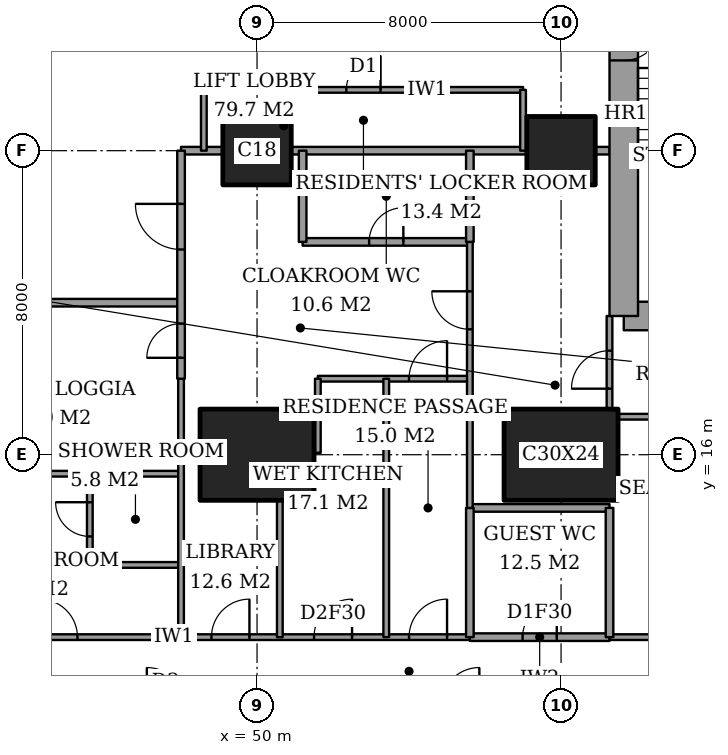
"""IFC4 building model, lengths in metres.
Left out: names, types, materials, properties, quantities, classifications, styles, units other than length and angle.
Written with IfcOpenShell. Run it as: python <this file> out.ifc"""

import sys

from ifc_helpers import new_model, si_unit, direction, frame, frame_2d, origin, origin_2d, place, context, subcontext, project, spatial, rectangle, extrude, element, fill, save


model = new_model("IFC4")
c1 = context("Model", 3, precision=1e-05, world=origin(), true_north=direction((0.0, 1.0)))
c2 = subcontext(c1, "Body", "Model", "MODEL_VIEW")
j1 = project(units=[si_unit("LENGTHUNIT", "METRE"), si_unit("PLANEANGLEUNIT", "RADIAN")], contexts=[c1])
p1 = place(None, origin())
s1 = spatial("IfcSite", under=j1, at=p1, CompositionType="ELEMENT")
p2 = place(p1, origin())
s2 = spatial("IfcBuilding", under=s1, at=p2, CompositionType="ELEMENT")
p3 = place(p2, frame((0.0, 0.0, 185.8)))
s3 = spatial("IfcBuildingStorey", under=s2, at=p3, CompositionType="ELEMENT", Elevation=185.8)
p4 = place(p3, frame((50.0, 16.0, 0.0), z_axis=(0.0, 0.0, 1.0), x_axis=(1.0, 0.0, 0.0)))
e1 = element("IfcColumn", 1, at=p4, inside=s3, PredefinedType="COLUMN", context=c2, shape_type="SweptSolid", body=[
    extrude(rectangle(XDim=3.0, YDim=2.4, at=origin_2d()), origin(), (0.0, 0.0, 1.0), 3.6),
])
p5 = place(p3, frame((50.0, 24.0, 0.0), z_axis=(0.0, 0.0, 1.0), x_axis=(1.0, 0.0, 0.0)))
e2 = element("IfcColumn", 2, at=p5, inside=s3, PredefinedType="COLUMN", context=c2, shape_type="SweptSolid", body=[
    extrude(rectangle(XDim=1.8, YDim=1.8, at=origin_2d()), origin(), (0.0, 0.0, 1.0), 3.6),
])
p6 = place(p3, frame((58.0, 16.0, 0.0), z_axis=(0.0, 0.0, 1.0), x_axis=(1.0, 0.0, 0.0)))
e3 = element("IfcColumn", 3, at=p6, inside=s3, PredefinedType="COLUMN", context=c2, shape_type="SweptSolid", body=[
    extrude(rectangle(XDim=3.0, YDim=2.4, at=origin_2d()), origin(), (0.0, 0.0, 1.0), 3.6),
])
p7 = place(p3, frame((58.0, 24.0, 0.0), z_axis=(0.0, 0.0, 1.0), x_axis=(1.0, 0.0, 0.0)))
e4 = element("IfcColumn", 4, at=p7, inside=s3, PredefinedType="COLUMN", context=c2, shape_type="SweptSolid", body=[
    extrude(rectangle(XDim=1.8, YDim=1.8, at=origin_2d()), origin(), (0.0, 0.0, 1.0), 3.6),
])
p8 = place(p3, frame((59.65, 19.65, 0.0), z_axis=(0.0, 0.0, 1.0), x_axis=(1.0, 0.0, 0.0)))
e5 = element("IfcWall", 5, at=p8, inside=s3, PredefinedType="SHEAR", context=c2, shape_type="SweptSolid", body=[
    extrude(rectangle(XDim=4.45, YDim=0.75, at=frame_2d((2.225, 0.0))), origin(), (0.0, 0.0, 1.0), 3.6),
])
p9 = place(p3, frame((59.65, 28.35, 0.0), z_axis=(0.0, 0.0, 1.0), x_axis=(0.0, -1.0, 0.0)))
e6 = element("IfcWall", 6, at=p9, inside=s3, PredefinedType="SHEAR", context=c2, shape_type="SweptSolid", body=[
    extrude(rectangle(XDim=8.7, YDim=0.75, at=frame_2d((4.35, 0.0))), origin(), (0.0, 0.0, 1.0), 3.6),
])
p10 = place(p9, frame((0.975, 0.0, 0.0)))
e7 = element("IfcOpeningElement", 7, at=p10, cuts=e6, PredefinedType="OPENING", context=c2, shape_type="SweptSolid", body=[
    extrude(rectangle(XDim=1.0, YDim=2.1, at=frame_2d((0.5, 1.05))), frame((0.0, 0.385, 0.0), z_axis=(0.0, -1.0, 0.0), x_axis=(1.0, 0.0, 0.0)), (0.0, 0.0, 1.0), 0.77),
])
p11 = place(p3, frame((55.6, 11.2, 0.0), z_axis=(0.0, 0.0, 1.0), x_axis=(1.0, 0.0, 0.0)))
e8 = element("IfcWall", 8, at=p11, inside=s3, PredefinedType="PARTITIONING", context=c2, shape_type="SweptSolid", body=[
    extrude(rectangle(XDim=3.675, YDim=0.2, at=frame_2d((1.837, 0.0))), origin(), (0.0, 0.0, 1.0), 3.35),
])
p12 = place(p11, frame((1.387, 0.0, 0.0)))
e9 = element("IfcOpeningElement", 9, at=p12, cuts=e8, PredefinedType="OPENING", context=c2, shape_type="SweptSolid", body=[
    extrude(rectangle(XDim=0.9, YDim=2.1, at=frame_2d((0.45, 1.05))), frame((0.0, 0.11, 0.0), z_axis=(0.0, -1.0, 0.0), x_axis=(1.0, 0.0, 0.0)), (0.0, 0.0, 1.0), 0.22),
])
p13 = place(p3, frame((41.439, 11.2, 0.0), z_axis=(0.0, 0.0, 1.0), x_axis=(1.0, 0.0, 0.0)))
e10 = element("IfcWall", 10, at=p13, inside=s3, PredefinedType="PARTITIONING", context=c2, shape_type="SweptSolid", body=[
    extrude(rectangle(XDim=14.161, YDim=0.15, at=frame_2d((7.081, 0.0))), origin(), (0.0, 0.0, 1.0), 3.35),
])
p14 = place(p13, frame((12.561, 0.0, 0.0)))
e11 = element("IfcOpeningElement", 11, at=p14, cuts=e10, PredefinedType="OPENING", context=c2, shape_type="SweptSolid", body=[
    extrude(rectangle(XDim=1.0, YDim=2.1, at=frame_2d((0.5, 1.05))), frame((0.0, 0.085, 0.0), z_axis=(0.0, -1.0, 0.0), x_axis=(1.0, 0.0, 0.0)), (0.0, 0.0, 1.0), 0.17),
])
p15 = place(p13, frame((10.061, 0.0, 0.0)))
e12 = element("IfcOpeningElement", 12, at=p15, cuts=e10, PredefinedType="OPENING", context=c2, shape_type="SweptSolid", body=[
    extrude(rectangle(XDim=1.0, YDim=2.1, at=frame_2d((0.5, 1.05))), frame((0.0, 0.085, 0.0), z_axis=(0.0, -1.0, 0.0), x_axis=(1.0, 0.0, 0.0)), (0.0, 0.0, 1.0), 0.17),
])
p16 = place(p13, frame((7.361, 0.0, 0.0)))
e13 = element("IfcOpeningElement", 13, at=p16, cuts=e10, PredefinedType="OPENING", context=c2, shape_type="SweptSolid", body=[
    extrude(rectangle(XDim=1.0, YDim=2.1, at=frame_2d((0.5, 1.05))), frame((0.0, 0.085, 0.0), z_axis=(0.0, -1.0, 0.0), x_axis=(1.0, 0.0, 0.0)), (0.0, 0.0, 1.0), 0.17),
])
p17 = place(p13, frame((2.836, 0.0, 0.0)))
e14 = element("IfcOpeningElement", 14, at=p17, cuts=e10, PredefinedType="OPENING", context=c2, shape_type="SweptSolid", body=[
    extrude(rectangle(XDim=1.0, YDim=2.1, at=frame_2d((0.5, 1.05))), frame((0.0, 0.085, 0.0), z_axis=(0.0, -1.0, 0.0), x_axis=(1.0, 0.0, 0.0)), (0.0, 0.0, 1.0), 0.17),
])
p18 = place(p3, frame((59.275, 11.2, 0.0), z_axis=(0.0, 0.0, 1.0), x_axis=(1.0, 0.0, 0.0)))
e15 = element("IfcWall", 15, at=p18, inside=s3, PredefinedType="PARTITIONING", context=c2, shape_type="SweptSolid", body=[
    extrude(rectangle(XDim=7.175, YDim=0.15, at=frame_2d((3.587, 0.0))), origin(), (0.0, 0.0, 1.0), 3.35),
])
p19 = place(p18, frame((3.087, 0.0, 0.0)))
e16 = element("IfcOpeningElement", 16, at=p19, cuts=e15, PredefinedType="OPENING", context=c2, shape_type="SweptSolid", body=[
    extrude(rectangle(XDim=1.0, YDim=2.1, at=frame_2d((0.5, 1.05))), frame((0.0, 0.085, 0.0), z_axis=(0.0, -1.0, 0.0), x_axis=(1.0, 0.0, 0.0)), (0.0, 0.0, 1.0), 0.17),
])
p20 = place(p3, frame((45.6, 13.1, 0.0), z_axis=(0.0, 0.0, 1.0), x_axis=(1.0, 0.0, 0.0)))
e17 = element("IfcWall", 17, at=p20, inside=s3, PredefinedType="PARTITIONING", context=c2, shape_type="SweptSolid", body=[
    extrude(rectangle(XDim=2.4, YDim=0.15, at=frame_2d((1.2, 0.0))), origin(), (0.0, 0.0, 1.0), 3.35),
])
p21 = place(p3, frame((55.6, 14.6, 0.0), z_axis=(0.0, 0.0, 1.0), x_axis=(1.0, 0.0, 0.0)))
e18 = element("IfcWall", 18, at=p21, inside=s3, PredefinedType="PARTITIONING", context=c2, shape_type="SweptSolid", body=[
    extrude(rectangle(XDim=3.675, YDim=0.2, at=frame_2d((1.837, 0.0))), origin(), (0.0, 0.0, 1.0), 3.35),
])
p22 = place(p3, frame((42.0, 15.5, 0.0), z_axis=(0.0, 0.0, 1.0), x_axis=(1.0, 0.0, 0.0)))
e19 = element("IfcWall", 19, at=p22, inside=s3, PredefinedType="PARTITIONING", context=c2, shape_type="SweptSolid", body=[
    extrude(rectangle(XDim=6.0, YDim=0.15, at=frame_2d((3.0, 0.0))), origin(), (0.0, 0.0, 1.0), 3.35),
])
p23 = place(p3, frame((48.0, 16.05, 0.0), z_axis=(0.0, 0.0, 1.0), x_axis=(1.0, 0.0, 0.0)))
e20 = element("IfcWall", 20, at=p23, inside=s3, PredefinedType="PARTITIONING", context=c2, shape_type="SweptSolid", body=[
    extrude(rectangle(XDim=0.5, YDim=0.15, at=frame_2d((0.25, 0.0))), origin(), (0.0, 0.0, 1.0), 2.634),
])
p24 = place(p3, frame((59.5, 17.0, 0.0), z_axis=(0.0, 0.0, 1.0), x_axis=(1.0, 0.0, 0.0)))
e21 = element("IfcWall", 21, at=p24, inside=s3, PredefinedType="PARTITIONING", context=c2, shape_type="SweptSolid", body=[
    extrude(rectangle(XDim=6.95, YDim=0.15, at=frame_2d((3.475, 0.0))), origin(), (0.0, 0.0, 1.0), 3.35),
])
p25 = place(p3, frame((51.6, 18.0, 0.0), z_axis=(0.0, 0.0, 1.0), x_axis=(1.0, 0.0, 0.0)))
e22 = element("IfcWall", 22, at=p25, inside=s3, PredefinedType="PARTITIONING", context=c2, shape_type="SweptSolid", body=[
    extrude(rectangle(XDim=4.0, YDim=0.15, at=frame_2d((2.0, 0.0))), origin(), (0.0, 0.0, 1.0), 3.35),
])
p26 = place(p25, frame((2.4, 0.0, 0.0)))
e23 = element("IfcOpeningElement", 23, at=p26, cuts=e22, PredefinedType="OPENING", context=c2, shape_type="SweptSolid", body=[
    extrude(rectangle(XDim=1.0, YDim=2.1, at=frame_2d((0.5, 1.05))), frame((0.0, 0.085, 0.0), z_axis=(0.0, -1.0, 0.0), x_axis=(1.0, 0.0, 0.0)), (0.0, 0.0, 1.0), 0.17),
])
p27 = place(p3, frame((42.0, 20.0, 0.0), z_axis=(0.0, 0.0, 1.0), x_axis=(1.0, 0.0, 0.0)))
e24 = element("IfcWall", 24, at=p27, inside=s3, PredefinedType="PARTITIONING", context=c2, shape_type="SweptSolid", body=[
    extrude(rectangle(XDim=6.0, YDim=0.2, at=frame_2d((3.0, 0.0))), origin(), (0.0, 0.0, 1.0), 3.35),
])
p28 = place(p3, frame((51.2, 21.6, 0.0), z_axis=(0.0, 0.0, 1.0), x_axis=(1.0, 0.0, 0.0)))
e25 = element("IfcWall", 25, at=p28, inside=s3, PredefinedType="PARTITIONING", context=c2, shape_type="SweptSolid", body=[
    extrude(rectangle(XDim=4.4, YDim=0.2, at=frame_2d((2.2, 0.0))), origin(), (0.0, 0.0, 1.0), 3.35),
])
p29 = place(p28, frame((1.75, 0.0, 0.0)))
e26 = element("IfcOpeningElement", 26, at=p29, cuts=e25, PredefinedType="OPENING", context=c2, shape_type="SweptSolid", body=[
    extrude(rectangle(XDim=0.9, YDim=2.1, at=frame_2d((0.45, 1.05))), frame((0.0, 0.11, 0.0), z_axis=(0.0, -1.0, 0.0), x_axis=(1.0, 0.0, 0.0)), (0.0, 0.0, 1.0), 0.22),
])
p30 = place(p3, frame((48.0, 24.0, 0.0), z_axis=(0.0, 0.0, 1.0), x_axis=(1.0, 0.0, 0.0)))
e27 = element("IfcWall", 27, at=p30, inside=s3, PredefinedType="PARTITIONING", context=c2, shape_type="SweptSolid", body=[
    extrude(rectangle(XDim=1.1, YDim=0.2, at=frame_2d((0.55, 0.0))), origin(), (0.0, 0.0, 1.0), 3.35),
])
p31 = place(p3, frame((50.9, 24.0, 0.0), z_axis=(0.0, 0.0, 1.0), x_axis=(1.0, 0.0, 0.0)))
e28 = element("IfcWall", 28, at=p31, inside=s3, PredefinedType="PARTITIONING", context=c2, shape_type="SweptSolid", body=[
    extrude(rectangle(XDim=6.2, YDim=0.2, at=frame_2d((3.1, 0.0))), origin(), (0.0, 0.0, 1.0), 3.35),
])
p32 = place(p3, frame((58.9, 24.0, 0.0), z_axis=(0.0, 0.0, 1.0), x_axis=(1.0, 0.0, 0.0)))
e29 = element("IfcWall", 29, at=p32, inside=s3, PredefinedType="PARTITIONING", context=c2, shape_type="SweptSolid", body=[
    extrude(rectangle(XDim=0.375, YDim=0.2, at=frame_2d((0.188, 0.0))), origin(), (0.0, 0.0, 1.0), 3.35),
])
p33 = place(p3, frame((48.6, 25.6, 0.0), z_axis=(0.0, 0.0, 1.0), x_axis=(1.0, 0.0, 0.0)))
e30 = element("IfcWall", 30, at=p33, inside=s3, PredefinedType="PARTITIONING", context=c2, shape_type="SweptSolid", body=[
    extrude(rectangle(XDim=8.4, YDim=0.15, at=frame_2d((4.2, 0.0))), origin(), (0.0, 0.0, 1.0), 3.35),
])
p34 = place(p33, frame((3.75, 0.0, 0.0)))
e31 = element("IfcOpeningElement", 31, at=p34, cuts=e30, PredefinedType="OPENING", context=c2, shape_type="SweptSolid", body=[
    extrude(rectangle(XDim=0.9, YDim=2.1, at=frame_2d((0.45, 1.05))), frame((0.0, 0.085, 0.0), z_axis=(0.0, -1.0, 0.0), x_axis=(1.0, 0.0, 0.0)), (0.0, 0.0, 1.0), 0.17),
])
p35 = place(p3, frame((45.6, 13.1, 0.0), z_axis=(0.0, 0.0, 1.0), x_axis=(0.0, 1.0, 0.0)))
e32 = element("IfcWall", 32, at=p35, inside=s3, PredefinedType="PARTITIONING", context=c2, shape_type="SweptSolid", body=[
    extrude(rectangle(XDim=2.4, YDim=0.15, at=frame_2d((1.2, 0.0))), origin(), (0.0, 0.0, 1.0), 3.35),
])
p36 = place(p35, frame((0.75, 0.0, 0.0)))
e33 = element("IfcOpeningElement", 33, at=p36, cuts=e32, PredefinedType="OPENING", context=c2, shape_type="SweptSolid", body=[
    extrude(rectangle(XDim=0.9, YDim=2.1, at=frame_2d((0.45, 1.05))), frame((0.0, 0.085, 0.0), z_axis=(0.0, -1.0, 0.0), x_axis=(1.0, 0.0, 0.0)), (0.0, 0.0, 1.0), 0.17),
])
p37 = place(p3, frame((48.0, 18.0, 0.0), z_axis=(0.0, 0.0, 1.0), x_axis=(0.0, 1.0, 0.0)))
e34 = element("IfcWall", 34, at=p37, inside=s3, PredefinedType="PARTITIONING", context=c2, shape_type="SweptSolid", body=[
    extrude(rectangle(XDim=6.0, YDim=0.2, at=frame_2d((3.0, 0.0))), origin(), (0.0, 0.0, 1.0), 3.35),
])
p38 = place(p37, frame((3.4, 0.0, 0.0)))
e35 = element("IfcOpeningElement", 35, at=p38, cuts=e34, PredefinedType="OPENING", context=c2, shape_type="SweptSolid", body=[
    extrude(rectangle(XDim=1.2, YDim=2.4, at=frame_2d((0.6, 1.2))), frame((0.0, 0.11, 0.0), z_axis=(0.0, -1.0, 0.0), x_axis=(1.0, 0.0, 0.0)), (0.0, 0.0, 1.0), 0.22),
])
p39 = place(p37, frame((0.55, 0.0, 0.0)))
e36 = element("IfcOpeningElement", 36, at=p39, cuts=e34, PredefinedType="OPENING", context=c2, shape_type="SweptSolid", body=[
    extrude(rectangle(XDim=0.9, YDim=2.1, at=frame_2d((0.45, 1.05))), frame((0.0, 0.11, 0.0), z_axis=(0.0, -1.0, 0.0), x_axis=(1.0, 0.0, 0.0)), (0.0, 0.0, 1.0), 0.22),
])
p40 = place(p3, frame((48.0, 11.2, 0.0), z_axis=(0.0, 0.0, 1.0), x_axis=(0.0, 1.0, 0.0)))
e37 = element("IfcWall", 37, at=p40, inside=s3, PredefinedType="PARTITIONING", context=c2, shape_type="SweptSolid", body=[
    extrude(rectangle(XDim=6.8, YDim=0.15, at=frame_2d((3.4, 0.0))), origin(), (0.0, 0.0, 1.0), 3.35),
])
p41 = place(p3, frame((48.6, 24.0, 0.0), z_axis=(0.0, 0.0, 1.0), x_axis=(0.0, 1.0, 0.0)))
e38 = element("IfcWall", 38, at=p41, inside=s3, PredefinedType="PARTITIONING", context=c2, shape_type="SweptSolid", body=[
    extrude(rectangle(XDim=1.6, YDim=0.15, at=frame_2d((0.8, 0.0))), origin(), (0.0, 0.0, 1.0), 3.35),
])
p42 = place(p3, frame((50.6, 11.2, 0.0), z_axis=(0.0, 0.0, 1.0), x_axis=(0.0, 1.0, 0.0)))
e39 = element("IfcWall", 39, at=p42, inside=s3, PredefinedType="PARTITIONING", context=c2, shape_type="SweptSolid", body=[
    extrude(rectangle(XDim=3.6, YDim=0.15, at=frame_2d((1.8, 0.0))), origin(), (0.0, 0.0, 1.0), 3.35),
])
p43 = place(p3, frame((51.2, 21.6, 0.0), z_axis=(0.0, 0.0, 1.0), x_axis=(0.0, 1.0, 0.0)))
e40 = element("IfcWall", 40, at=p43, inside=s3, PredefinedType="PARTITIONING", context=c2, shape_type="SweptSolid", body=[
    extrude(rectangle(XDim=2.4, YDim=0.2, at=frame_2d((1.2, 0.0))), origin(), (0.0, 0.0, 1.0), 3.35),
])
p44 = place(p3, frame((51.6, 16.05, 0.0), z_axis=(0.0, 0.0, 1.0), x_axis=(0.0, 1.0, 0.0)))
e41 = element("IfcWall", 41, at=p44, inside=s3, PredefinedType="PARTITIONING", context=c2, shape_type="SweptSolid", body=[
    extrude(rectangle(XDim=1.95, YDim=0.15, at=frame_2d((0.975, 0.0))), origin(), (0.0, 0.0, 1.0), 3.35),
])
p45 = place(p3, frame((53.4, 11.2, 0.0), z_axis=(0.0, 0.0, 1.0), x_axis=(0.0, 1.0, 0.0)))
e42 = element("IfcWall", 42, at=p45, inside=s3, PredefinedType="PARTITIONING", context=c2, shape_type="SweptSolid", body=[
    extrude(rectangle(XDim=6.8, YDim=0.15, at=frame_2d((3.4, 0.0))), origin(), (0.0, 0.0, 1.0), 3.35),
])
p46 = place(p3, frame((55.6, 11.2, 0.0), z_axis=(0.0, 0.0, 1.0), x_axis=(0.0, 1.0, 0.0)))
e43 = element("IfcWall", 43, at=p46, inside=s3, PredefinedType="PARTITIONING", context=c2, shape_type="SweptSolid", body=[
    extrude(rectangle(XDim=3.4, YDim=0.2, at=frame_2d((1.7, 0.0))), origin(), (0.0, 0.0, 1.0), 3.35),
])
p47 = place(p3, frame((55.6, 21.6, 0.0), z_axis=(0.0, 0.0, 1.0), x_axis=(0.0, 1.0, 0.0)))
e44 = element("IfcWall", 44, at=p47, inside=s3, PredefinedType="PARTITIONING", context=c2, shape_type="SweptSolid", body=[
    extrude(rectangle(XDim=2.4, YDim=0.2, at=frame_2d((1.2, 0.0))), origin(), (0.0, 0.0, 1.0), 3.35),
])
p48 = place(p3, frame((55.6, 14.6, 0.0), z_axis=(0.0, 0.0, 1.0), x_axis=(0.0, 1.0, 0.0)))
e45 = element("IfcWall", 45, at=p48, inside=s3, PredefinedType="PARTITIONING", context=c2, shape_type="SweptSolid", body=[
    extrude(rectangle(XDim=7.0, YDim=0.15, at=frame_2d((3.5, 0.0))), origin(), (0.0, 0.0, 1.0), 3.35),
])
p49 = place(p48, frame((4.7, 0.0, 0.0)))
e46 = element("IfcOpeningElement", 46, at=p49, cuts=e45, PredefinedType="OPENING", context=c2, shape_type="SweptSolid", body=[
    extrude(rectangle(XDim=1.0, YDim=2.1, at=frame_2d((0.5, 1.05))), frame((0.0, 0.085, 0.0), z_axis=(0.0, -1.0, 0.0), x_axis=(1.0, 0.0, 0.0)), (0.0, 0.0, 1.0), 0.17),
])
p50 = place(p3, frame((57.0, 24.0, 0.0), z_axis=(0.0, 0.0, 1.0), x_axis=(0.0, 1.0, 0.0)))
e47 = element("IfcWall", 47, at=p50, inside=s3, PredefinedType="PARTITIONING", context=c2, shape_type="SweptSolid", body=[
    extrude(rectangle(XDim=1.6, YDim=0.15, at=frame_2d((0.8, 0.0))), origin(), (0.0, 0.0, 1.0), 3.35),
])
p51 = place(p3, frame((59.275, 11.2, 0.0), z_axis=(0.0, 0.0, 1.0), x_axis=(0.0, 1.0, 0.0)))
e48 = element("IfcWall", 48, at=p51, inside=s3, PredefinedType="PARTITIONING", context=c2, shape_type="SweptSolid", body=[
    extrude(rectangle(XDim=3.4, YDim=0.2, at=frame_2d((1.7, 0.0))), origin(), (0.0, 0.0, 1.0), 3.35),
])
p52 = place(p3, frame((59.275, 17.2, 0.0), z_axis=(0.0, 0.0, 1.0), x_axis=(0.0, 1.0, 0.0)))
e49 = element("IfcWall", 49, at=p52, inside=s3, PredefinedType="PARTITIONING", context=c2, shape_type="SweptSolid", body=[
    extrude(rectangle(XDim=2.45, YDim=0.15, at=frame_2d((1.225, 0.0))), origin(), (0.0, 0.0, 1.0), 3.35),
])
p53 = place(p52, frame((0.538, 0.0, 0.0)))
e50 = element("IfcOpeningElement", 50, at=p53, cuts=e49, PredefinedType="OPENING", context=c2, shape_type="SweptSolid", body=[
    extrude(rectangle(XDim=1.0, YDim=2.1, at=frame_2d((0.5, 1.05))), frame((0.0, 0.085, 0.0), z_axis=(0.0, -1.0, 0.0), x_axis=(1.0, 0.0, 0.0)), (0.0, 0.0, 1.0), 0.17),
])
p54 = place(p14, origin())
e51 = element("IfcDoor", 51, at=p54, inside=s3, OperationType="SINGLE_SWING_LEFT", PredefinedType="DOOR", context=c2, shape_type="SweptSolid", body=[
    extrude(rectangle(XDim=1.0, YDim=2.1, at=frame_2d((0.5, 1.05))), frame((0.0, 0.025, 0.0), z_axis=(0.0, -1.0, 0.0), x_axis=(1.0, 0.0, 0.0)), (0.0, 0.0, 1.0), 0.05),
])
fill(e11, e51)
p55 = place(p53, origin())
e52 = element("IfcDoor", 52, at=p55, inside=s3, OperationType="SINGLE_SWING_RIGHT", PredefinedType="DOOR", context=c2, shape_type="SweptSolid", body=[
    extrude(rectangle(XDim=1.0, YDim=2.1, at=frame_2d((0.5, 1.05))), frame((0.0, 0.025, 0.0), z_axis=(0.0, -1.0, 0.0), x_axis=(1.0, 0.0, 0.0)), (0.0, 0.0, 1.0), 0.05),
])
fill(e50, e52)
p56 = place(p12, origin())
e53 = element("IfcDoor", 53, at=p56, inside=s3, OperationType="SINGLE_SWING_LEFT", PredefinedType="DOOR", context=c2, shape_type="SweptSolid", body=[
    extrude(rectangle(XDim=0.9, YDim=2.1, at=frame_2d((0.45, 1.05))), frame((0.0, 0.025, 0.0), z_axis=(0.0, -1.0, 0.0), x_axis=(1.0, 0.0, 0.0)), (0.0, 0.0, 1.0), 0.05),
])
fill(e9, e53)
p57 = place(p49, origin())
e54 = element("IfcDoor", 54, at=p57, inside=s3, OperationType="SINGLE_SWING_LEFT", PredefinedType="DOOR", context=c2, shape_type="SweptSolid", body=[
    extrude(rectangle(XDim=1.0, YDim=2.1, at=frame_2d((0.5, 1.05))), frame((0.0, 0.025, 0.0), z_axis=(0.0, -1.0, 0.0), x_axis=(1.0, 0.0, 0.0)), (0.0, 0.0, 1.0), 0.05),
])
fill(e46, e54)
p58 = place(p29, origin())
e55 = element("IfcDoor", 55, at=p58, inside=s3, OperationType="SINGLE_SWING_LEFT", PredefinedType="DOOR", context=c2, shape_type="SweptSolid", body=[
    extrude(rectangle(XDim=0.9, YDim=2.1, at=frame_2d((0.45, 1.05))), frame((0.0, 0.025, 0.0), z_axis=(0.0, -1.0, 0.0), x_axis=(1.0, 0.0, 0.0)), (0.0, 0.0, 1.0), 0.05),
])
fill(e26, e55)
p59 = place(p38, origin())
e56 = element("IfcDoor", 56, at=p59, inside=s3, OperationType="SINGLE_SWING_LEFT", PredefinedType="DOOR", context=c2, shape_type="SweptSolid", body=[
    extrude(rectangle(XDim=1.2, YDim=2.4, at=frame_2d((0.6, 1.2))), frame((0.0, 0.025, 0.0), z_axis=(0.0, -1.0, 0.0), x_axis=(1.0, 0.0, 0.0)), (0.0, 0.0, 1.0), 0.05),
])
fill(e35, e56)
p60 = place(p26, origin())
e57 = element("IfcDoor", 57, at=p60, inside=s3, OperationType="SINGLE_SWING_LEFT", PredefinedType="DOOR", context=c2, shape_type="SweptSolid", body=[
    extrude(rectangle(XDim=1.0, YDim=2.1, at=frame_2d((0.5, 1.05))), frame((0.0, 0.025, 0.0), z_axis=(0.0, -1.0, 0.0), x_axis=(1.0, 0.0, 0.0)), (0.0, 0.0, 1.0), 0.05),
])
fill(e23, e57)
p61 = place(p15, origin())
e58 = element("IfcDoor", 58, at=p61, inside=s3, OperationType="SINGLE_SWING_LEFT", PredefinedType="DOOR", context=c2, shape_type="SweptSolid", body=[
    extrude(rectangle(XDim=1.0, YDim=2.1, at=frame_2d((0.5, 1.05))), frame((0.0, 0.025, 0.0), z_axis=(0.0, -1.0, 0.0), x_axis=(1.0, 0.0, 0.0)), (0.0, 0.0, 1.0), 0.05),
])
fill(e12, e58)
p62 = place(p16, origin())
e59 = element("IfcDoor", 59, at=p62, inside=s3, OperationType="SINGLE_SWING_LEFT", PredefinedType="DOOR", context=c2, shape_type="SweptSolid", body=[
    extrude(rectangle(XDim=1.0, YDim=2.1, at=frame_2d((0.5, 1.05))), frame((0.0, 0.025, 0.0), z_axis=(0.0, -1.0, 0.0), x_axis=(1.0, 0.0, 0.0)), (0.0, 0.0, 1.0), 0.05),
])
fill(e13, e59)
p63 = place(p36, origin())
e60 = element("IfcDoor", 60, at=p63, inside=s3, OperationType="SINGLE_SWING_LEFT", PredefinedType="DOOR", context=c2, shape_type="SweptSolid", body=[
    extrude(rectangle(XDim=0.9, YDim=2.1, at=frame_2d((0.45, 1.05))), frame((0.0, 0.025, 0.0), z_axis=(0.0, -1.0, 0.0), x_axis=(1.0, 0.0, 0.0)), (0.0, 0.0, 1.0), 0.05),
])
fill(e33, e60)
p64 = place(p17, origin())
e61 = element("IfcDoor", 61, at=p64, inside=s3, OperationType="SINGLE_SWING_RIGHT", PredefinedType="DOOR", context=c2, shape_type="SweptSolid", body=[
    extrude(rectangle(XDim=1.0, YDim=2.1, at=frame_2d((0.5, 1.05))), frame((0.0, 0.025, 0.0), z_axis=(0.0, -1.0, 0.0), x_axis=(1.0, 0.0, 0.0)), (0.0, 0.0, 1.0), 0.05),
])
fill(e14, e61)
p65 = place(p39, origin())
e62 = element("IfcDoor", 62, at=p65, inside=s3, OperationType="SINGLE_SWING_RIGHT", PredefinedType="DOOR", context=c2, shape_type="SweptSolid", body=[
    extrude(rectangle(XDim=0.9, YDim=2.1, at=frame_2d((0.45, 1.05))), frame((0.0, 0.025, 0.0), z_axis=(0.0, -1.0, 0.0), x_axis=(1.0, 0.0, 0.0)), (0.0, 0.0, 1.0), 0.05),
])
fill(e36, e62)
p66 = place(p34, origin())
e63 = element("IfcDoor", 63, at=p66, inside=s3, OperationType="SINGLE_SWING_LEFT", PredefinedType="DOOR", context=c2, shape_type="SweptSolid", body=[
    extrude(rectangle(XDim=0.9, YDim=2.1, at=frame_2d((0.45, 1.05))), frame((0.0, 0.025, 0.0), z_axis=(0.0, -1.0, 0.0), x_axis=(1.0, 0.0, 0.0)), (0.0, 0.0, 1.0), 0.05),
])
fill(e31, e63)
p67 = place(p10, origin())
e64 = element("IfcDoor", 64, at=p67, inside=s3, OperationType="SINGLE_SWING_RIGHT", PredefinedType="DOOR", context=c2, shape_type="SweptSolid", body=[
    extrude(rectangle(XDim=1.0, YDim=2.1, at=frame_2d((0.5, 1.05))), frame((0.0, 0.025, 0.0), z_axis=(0.0, -1.0, 0.0), x_axis=(1.0, 0.0, 0.0)), (0.0, 0.0, 1.0), 0.05),
])
fill(e7, e64)
save(model, sys.argv[1])
